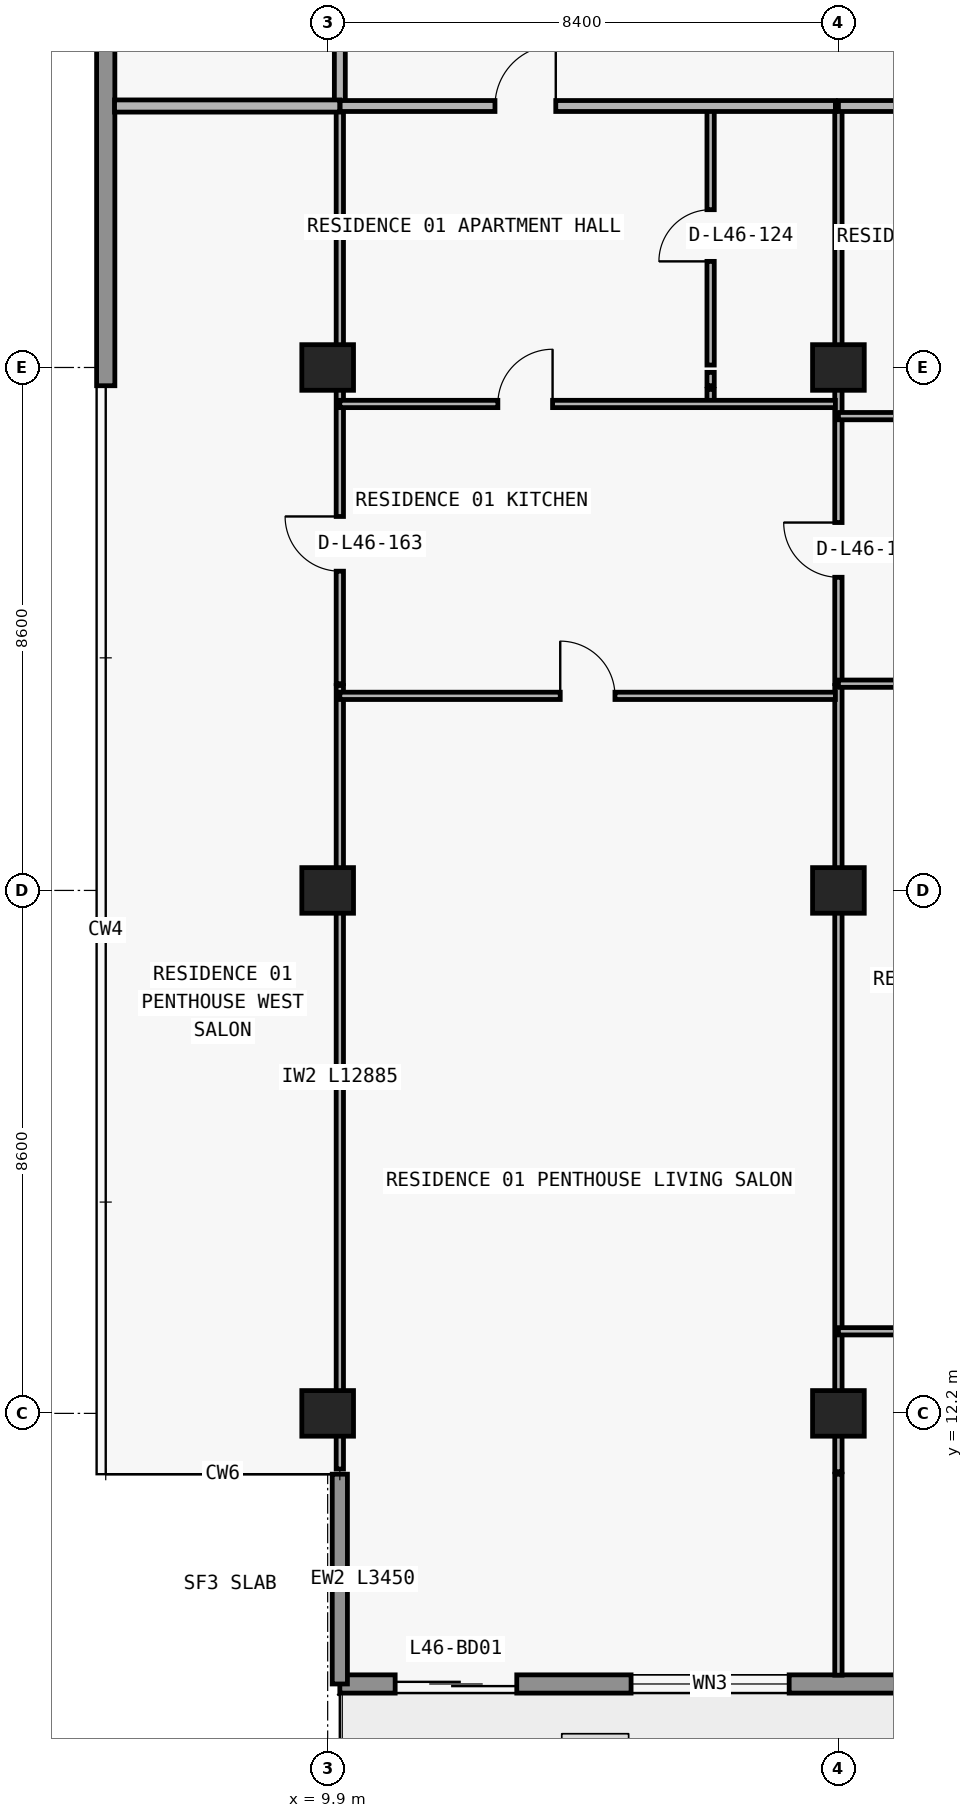
"""IFC4 building model, lengths in metres.
Left out: names, types, materials, properties, quantities, classifications, styles, units other than length and angle.
Written with IfcOpenShell. Run it as: python <this file> out.ifc"""

import sys

from ifc_helpers import new_model, si_unit, direction, frame, frame_2d, origin, origin_2d, place, context, subcontext, project, spatial, rectangle, extrude, element, fill, save


model = new_model("IFC4")
c1 = context("Model", 3, precision=1e-05, world=origin(), true_north=direction((0.0, 1.0)))
c2 = subcontext(c1, "Body", "Model", "MODEL_VIEW")
j1 = project(units=[si_unit("LENGTHUNIT", "METRE"), si_unit("PLANEANGLEUNIT", "RADIAN")], contexts=[c1])
p1 = place(None, origin())
s1 = spatial("IfcSite", under=j1, at=p1, CompositionType="ELEMENT")
p2 = place(p1, origin())
s2 = spatial("IfcBuilding", under=s1, at=p2, CompositionType="ELEMENT")
p3 = place(p2, frame((0.0, 0.0, 167.1)))
s3 = spatial("IfcBuildingStorey", under=s2, at=p3, CompositionType="ELEMENT", Elevation=167.1)
for number, where, z_axis, x_axis in (
    (1, (9.9, 12.2, 0.0), (0.0, 0.0, 1.0), (1.0, 0.0, 0.0)),
    (2, (18.3, 12.2, 0.0), (0.0, 0.0, 1.0), (1.0, 0.0, 0.0)),
    (3, (9.9, 20.8, 0.0), (0.0, 0.0, 1.0), (1.0, 0.0, 0.0)),
    (4, (18.3, 20.8, 0.0), (0.0, 0.0, 1.0), (1.0, 0.0, 0.0)),
    (5, (9.9, 29.4, 0.0), (0.0, 0.0, 1.0), (1.0, 0.0, 0.0)),
    (6, (18.3, 29.4, 0.0), (0.0, 0.0, 1.0), (1.0, 0.0, 0.0)),
):
    element("IfcColumn", number, at=place(p3, frame(where, z_axis=z_axis, x_axis=x_axis)), inside=s3, PredefinedType="COLUMN", context=c2, shape_type="SweptSolid", body=[
        extrude(rectangle(XDim=0.85, YDim=0.75, at=origin_2d()), origin(), (0.0, 0.0, 1.0), 3.05),
    ])
p4 = place(p3, frame((67.7, 7.75, 0.0), z_axis=(0.0, 0.0, 1.0), x_axis=(-1.0, 0.0, 0.0)))
e7 = element("IfcWall", 7, at=p4, inside=s3, PredefinedType="STANDARD", context=c2, shape_type="SweptSolid", body=[
    extrude(rectangle(XDim=57.6, YDim=0.3, at=frame_2d((28.8, 0.0))), origin(), (0.0, 0.0, 1.0), 3.05),
])
p5 = place(p4, frame((54.69, 0.0, 0.0)))
e8 = element("IfcOpeningElement", 8, at=p5, cuts=e7, PredefinedType="OPENING", context=c2, shape_type="SweptSolid", body=[
    extrude(rectangle(XDim=2.0, YDim=2.3, at=frame_2d((1.0, 1.15))), frame((0.0, 0.16, 0.0), z_axis=(0.0, -1.0, 0.0), x_axis=(1.0, 0.0, 0.0)), (0.0, 0.0, 1.0), 0.32),
])
p6 = place(p4, frame((50.21, 0.0, 0.65)))
e9 = element("IfcOpeningElement", 9, at=p6, cuts=e7, PredefinedType="OPENING", context=c2, shape_type="SweptSolid", body=[
    extrude(rectangle(XDim=2.6, YDim=1.85, at=frame_2d((1.3, 0.925))), frame((0.0, 0.16, 0.0), z_axis=(0.0, -1.0, 0.0), x_axis=(1.0, 0.0, 0.0)), (0.0, 0.0, 1.0), 0.32),
])
p7 = place(p4, frame((44.1, 0.0, 0.85)))
e10 = element("IfcOpeningElement", 10, at=p7, cuts=e7, PredefinedType="OPENING", context=c2, shape_type="SweptSolid", body=[
    extrude(rectangle(XDim=2.2, YDim=1.55, at=frame_2d((1.1, 0.775))), frame((0.0, 0.16, 0.0), z_axis=(0.0, -1.0, 0.0), x_axis=(1.0, 0.0, 0.0)), (0.0, 0.0, 1.0), 0.32),
])
p8 = place(p4, frame((37.69, 0.0, 0.0)))
e11 = element("IfcOpeningElement", 11, at=p8, cuts=e7, PredefinedType="OPENING", context=c2, shape_type="SweptSolid", body=[
    extrude(rectangle(XDim=2.0, YDim=2.3, at=frame_2d((1.0, 1.15))), frame((0.0, 0.16, 0.0), z_axis=(0.0, -1.0, 0.0), x_axis=(1.0, 0.0, 0.0)), (0.0, 0.0, 1.0), 0.32),
])
p9 = place(p4, frame((33.59, 0.0, 0.85)))
e12 = element("IfcOpeningElement", 12, at=p9, cuts=e7, PredefinedType="OPENING", context=c2, shape_type="SweptSolid", body=[
    extrude(rectangle(XDim=1.8, YDim=1.55, at=frame_2d((0.9, 0.775))), frame((0.0, 0.16, 0.0), z_axis=(0.0, -1.0, 0.0), x_axis=(1.0, 0.0, 0.0)), (0.0, 0.0, 1.0), 0.32),
])
p10 = place(p4, frame((25.914, 0.0, 0.85)))
e13 = element("IfcOpeningElement", 13, at=p10, cuts=e7, PredefinedType="OPENING", context=c2, shape_type="SweptSolid", body=[
    extrude(rectangle(XDim=2.2, YDim=1.55, at=frame_2d((1.1, 0.775))), frame((0.0, 0.16, 0.0), z_axis=(0.0, -1.0, 0.0), x_axis=(1.0, 0.0, 0.0)), (0.0, 0.0, 1.0), 0.32),
])
p11 = place(p4, frame((21.69, 0.0, 0.0)))
e14 = element("IfcOpeningElement", 14, at=p11, cuts=e7, PredefinedType="OPENING", context=c2, shape_type="SweptSolid", body=[
    extrude(rectangle(XDim=2.0, YDim=2.3, at=frame_2d((1.0, 1.15))), frame((0.0, 0.16, 0.0), z_axis=(0.0, -1.0, 0.0), x_axis=(1.0, 0.0, 0.0)), (0.0, 0.0, 1.0), 0.32),
])
p12 = place(p4, frame((17.59, 0.0, 0.85)))
e15 = element("IfcOpeningElement", 15, at=p12, cuts=e7, PredefinedType="OPENING", context=c2, shape_type="SweptSolid", body=[
    extrude(rectangle(XDim=1.8, YDim=1.55, at=frame_2d((0.9, 0.775))), frame((0.0, 0.16, 0.0), z_axis=(0.0, -1.0, 0.0), x_axis=(1.0, 0.0, 0.0)), (0.0, 0.0, 1.0), 0.32),
])
p13 = place(p4, frame((13.69, 0.0, 0.0)))
e16 = element("IfcOpeningElement", 16, at=p13, cuts=e7, PredefinedType="OPENING", context=c2, shape_type="SweptSolid", body=[
    extrude(rectangle(XDim=2.0, YDim=2.3, at=frame_2d((1.0, 1.15))), frame((0.0, 0.16, 0.0), z_axis=(0.0, -1.0, 0.0), x_axis=(1.0, 0.0, 0.0)), (0.0, 0.0, 1.0), 0.32),
])
p14 = place(p4, frame((9.01, 0.0, 0.65)))
e17 = element("IfcOpeningElement", 17, at=p14, cuts=e7, PredefinedType="OPENING", context=c2, shape_type="SweptSolid", body=[
    extrude(rectangle(XDim=2.6, YDim=1.85, at=frame_2d((1.3, 0.925))), frame((0.0, 0.16, 0.0), z_axis=(0.0, -1.0, 0.0), x_axis=(1.0, 0.0, 0.0)), (0.0, 0.0, 1.0), 0.32),
])
p15 = place(p4, frame((3.0, 0.0, 0.85)))
e18 = element("IfcOpeningElement", 18, at=p15, cuts=e7, PredefinedType="OPENING", context=c2, shape_type="SweptSolid", body=[
    extrude(rectangle(XDim=2.2, YDim=1.55, at=frame_2d((1.1, 0.775))), frame((0.0, 0.16, 0.0), z_axis=(0.0, -1.0, 0.0), x_axis=(1.0, 0.0, 0.0)), (0.0, 0.0, 1.0), 0.32),
])
p16 = place(p3, frame((10.1, 11.2, 0.0), z_axis=(0.0, 0.0, 1.0), x_axis=(0.0, -1.0, 0.0)))
e19 = element("IfcWall", 19, at=p16, inside=s3, PredefinedType="ELEMENTEDWALL", context=c2, shape_type="SweptSolid", body=[
    extrude(rectangle(XDim=3.45, YDim=0.25, at=frame_2d((1.725, 0.0))), origin(), (0.0, 0.0, 1.0), 3.05),
])
p17 = place(p3, frame((6.25, 29.1, 0.0), z_axis=(0.0, 0.0, 1.0), x_axis=(0.0, 1.0, 0.0)))
e20 = element("IfcWall", 20, at=p17, inside=s3, PredefinedType="STANDARD", context=c2, shape_type="SweptSolid", body=[
    extrude(rectangle(XDim=17.9, YDim=0.3, at=frame_2d((8.95, 0.0))), origin(), (0.0, 0.0, 1.0), 3.05),
])
p18 = place(p3, frame((10.1, 11.285, 0.0), z_axis=(0.0, 0.0, 1.0), x_axis=(0.0, 1.0, 0.0)))
e21 = element("IfcWall", 21, at=p18, inside=s3, PredefinedType="PARTITIONING", context=c2, shape_type="SweptSolid", body=[
    extrude(rectangle(XDim=12.885, YDim=0.12, at=frame_2d((6.442, 0.0))), origin(), (0.0, 0.0, 1.0), 2.263),
])
p19 = place(p3, frame((10.1, 24.2, 0.0), z_axis=(0.0, 0.0, 1.0), x_axis=(0.0, 1.0, 0.0)))
e22 = element("IfcWall", 22, at=p19, inside=s3, PredefinedType="PARTITIONING", context=c2, shape_type="SweptSolid", body=[
    extrude(rectangle(XDim=4.84, YDim=0.12, at=frame_2d((2.42, 0.0))), origin(), (0.0, 0.0, 1.0), 2.263),
])
p20 = place(p19, frame((1.85, 0.0, 0.0)))
e23 = element("IfcOpeningElement", 23, at=p20, cuts=e22, PredefinedType="OPENING", context=c2, shape_type="SweptSolid", body=[
    extrude(rectangle(XDim=0.9, YDim=2.15, at=frame_2d((0.45, 1.075))), frame((0.0, 0.07, 0.0), z_axis=(0.0, -1.0, 0.0), x_axis=(1.0, 0.0, 0.0)), (0.0, 0.0, 1.0), 0.14),
])
p21 = place(p3, frame((10.1, 29.1, 0.0), z_axis=(0.0, 0.0, 1.0), x_axis=(0.0, 1.0, 0.0)))
e24 = element("IfcWall", 24, at=p21, inside=s3, PredefinedType="PARTITIONING", context=c2, shape_type="SweptSolid", body=[
    extrude(rectangle(XDim=0.22, YDim=0.12, at=frame_2d((0.11, 0.0))), origin(), (0.0, 0.0, 1.0), 3.05),
])
p22 = place(p3, frame((10.1, 29.44, 0.0), z_axis=(0.0, 0.0, 1.0), x_axis=(0.0, 1.0, 0.0)))
e25 = element("IfcWall", 25, at=p22, inside=s3, PredefinedType="PARTITIONING", context=c2, shape_type="SweptSolid", body=[
    extrude(rectangle(XDim=4.26, YDim=0.12, at=frame_2d((2.13, 0.0))), origin(), (0.0, 0.0, 1.0), 2.263),
])
p23 = place(p3, frame((10.1, 33.705, 0.0), z_axis=(0.0, 0.0, 1.0), x_axis=(0.0, 1.0, 0.0)))
e26 = element("IfcWall", 26, at=p23, inside=s3, PredefinedType="PARTITIONING", context=c2, shape_type="SweptSolid", body=[
    extrude(rectangle(XDim=3.245, YDim=0.18, at=frame_2d((1.623, 0.0))), origin(), (0.0, 0.0, 1.0), 2.263),
])
p24 = place(p3, frame((16.198, 28.8, 0.0), z_axis=(0.0, 0.0, 1.0), x_axis=(0.0, 1.0, 0.0)))
e27 = element("IfcWall", 27, at=p24, inside=s3, PredefinedType="PARTITIONING", context=c2, shape_type="SweptSolid", body=[
    extrude(rectangle(XDim=0.24, YDim=0.12, at=frame_2d((0.12, 0.0))), origin(), (0.0, 0.0, 1.0), 3.05),
])
p25 = place(p3, frame((16.198, 29.1, 0.0), z_axis=(0.0, 0.0, 1.0), x_axis=(0.0, 1.0, 0.0)))
e28 = element("IfcWall", 28, at=p25, inside=s3, PredefinedType="PARTITIONING", context=c2, shape_type="SweptSolid", body=[
    extrude(rectangle(XDim=0.22, YDim=0.12, at=frame_2d((0.11, 0.0))), origin(), (0.0, 0.0, 1.0), 3.05),
])
p26 = place(p3, frame((16.198, 29.44, 0.0), z_axis=(0.0, 0.0, 1.0), x_axis=(0.0, 1.0, 0.0)))
e29 = element("IfcWall", 29, at=p26, inside=s3, PredefinedType="PARTITIONING", context=c2, shape_type="SweptSolid", body=[
    extrude(rectangle(XDim=4.26, YDim=0.12, at=frame_2d((2.13, 0.0))), origin(), (0.0, 0.0, 1.0), 3.05),
])
p27 = place(p26, frame((1.705, 0.0, 0.0)))
e30 = element("IfcOpeningElement", 30, at=p27, cuts=e29, PredefinedType="OPENING", context=c2, shape_type="SweptSolid", body=[
    extrude(rectangle(XDim=0.85, YDim=2.1, at=frame_2d((0.425, 1.05))), frame((0.0, 0.07, 0.0), z_axis=(0.0, -1.0, 0.0), x_axis=(1.0, 0.0, 0.0)), (0.0, 0.0, 1.0), 0.14),
])
p28 = place(p3, frame((18.3, 7.895, 0.0), z_axis=(0.0, 0.0, 1.0), x_axis=(0.0, 1.0, 0.0)))
e31 = element("IfcWall", 31, at=p28, inside=s3, PredefinedType="PARTITIONING", context=c2, shape_type="SweptSolid", body=[
    extrude(rectangle(XDim=3.305, YDim=0.12, at=frame_2d((1.652, 0.0))), origin(), (0.0, 0.0, 1.0), 3.05),
])
p29 = place(p3, frame((18.3, 11.24, 0.0), z_axis=(0.0, 0.0, 1.0), x_axis=(0.0, 1.0, 0.0)))
e32 = element("IfcWall", 32, at=p29, inside=s3, PredefinedType="PARTITIONING", context=c2, shape_type="SweptSolid", body=[
    extrude(rectangle(XDim=12.93, YDim=0.12, at=frame_2d((6.465, 0.0))), origin(), (0.0, 0.0, 1.0), 2.263),
])
p30 = place(p3, frame((18.3, 24.2, 0.0), z_axis=(0.0, 0.0, 1.0), x_axis=(0.0, 1.0, 0.0)))
e33 = element("IfcWall", 33, at=p30, inside=s3, PredefinedType="PARTITIONING", context=c2, shape_type="SweptSolid", body=[
    extrude(rectangle(XDim=4.84, YDim=0.12, at=frame_2d((2.42, 0.0))), origin(), (0.0, 0.0, 1.0), 2.263),
])
p31 = place(p30, frame((1.75, 0.0, 0.0)))
e34 = element("IfcOpeningElement", 34, at=p31, cuts=e33, PredefinedType="OPENING", context=c2, shape_type="SweptSolid", body=[
    extrude(rectangle(XDim=0.9, YDim=2.15, at=frame_2d((0.45, 1.075))), frame((0.0, 0.07, 0.0), z_axis=(0.0, -1.0, 0.0), x_axis=(1.0, 0.0, 0.0)), (0.0, 0.0, 1.0), 0.14),
])
p32 = place(p3, frame((18.3, 29.1, 0.0), z_axis=(0.0, 0.0, 1.0), x_axis=(0.0, 1.0, 0.0)))
e35 = element("IfcWall", 35, at=p32, inside=s3, PredefinedType="PARTITIONING", context=c2, shape_type="SweptSolid", body=[
    extrude(rectangle(XDim=0.22, YDim=0.12, at=frame_2d((0.11, 0.0))), origin(), (0.0, 0.0, 1.0), 3.05),
])
p33 = place(p3, frame((18.3, 29.44, 0.0), z_axis=(0.0, 0.0, 1.0), x_axis=(0.0, 1.0, 0.0)))
e36 = element("IfcWall", 36, at=p33, inside=s3, PredefinedType="PARTITIONING", context=c2, shape_type="SweptSolid", body=[
    extrude(rectangle(XDim=4.26, YDim=0.12, at=frame_2d((2.13, 0.0))), origin(), (0.0, 0.0, 1.0), 2.263),
])
p34 = place(p3, frame((18.3, 13.55, 0.0), z_axis=(0.0, 0.0, 1.0), x_axis=(1.0, 0.0, 0.0)))
e37 = element("IfcWall", 37, at=p34, inside=s3, PredefinedType="PARTITIONING", context=c2, shape_type="SweptSolid", body=[
    extrude(rectangle(XDim=8.35, YDim=0.12, at=frame_2d((4.175, 0.0))), origin(), (0.0, 0.0, 1.0), 3.05),
])
p35 = place(p34, frame((3.725, 0.0, 0.0)))
e38 = element("IfcOpeningElement", 38, at=p35, cuts=e37, PredefinedType="OPENING", context=c2, shape_type="SweptSolid", body=[
    extrude(rectangle(XDim=0.9, YDim=2.15, at=frame_2d((0.45, 1.075))), frame((0.0, 0.07, 0.0), z_axis=(0.0, -1.0, 0.0), x_axis=(1.0, 0.0, 0.0)), (0.0, 0.0, 1.0), 0.14),
])
p36 = place(p3, frame((10.1, 24.0, 0.0), z_axis=(0.0, 0.0, 1.0), x_axis=(1.0, 0.0, 0.0)))
e39 = element("IfcWall", 39, at=p36, inside=s3, PredefinedType="PARTITIONING", context=c2, shape_type="SweptSolid", body=[
    extrude(rectangle(XDim=8.15, YDim=0.12, at=frame_2d((4.075, 0.0))), origin(), (0.0, 0.0, 1.0), 3.05),
])
p37 = place(p36, frame((3.625, 0.0, 0.0)))
e40 = element("IfcOpeningElement", 40, at=p37, cuts=e39, PredefinedType="OPENING", context=c2, shape_type="SweptSolid", body=[
    extrude(rectangle(XDim=0.9, YDim=2.15, at=frame_2d((0.45, 1.075))), frame((0.0, 0.07, 0.0), z_axis=(0.0, -1.0, 0.0), x_axis=(1.0, 0.0, 0.0)), (0.0, 0.0, 1.0), 0.14),
])
p38 = place(p3, frame((18.3, 24.2, 0.0), z_axis=(0.0, 0.0, 1.0), x_axis=(1.0, 0.0, 0.0)))
e41 = element("IfcWall", 41, at=p38, inside=s3, PredefinedType="PARTITIONING", context=c2, shape_type="SweptSolid", body=[
    extrude(rectangle(XDim=8.18, YDim=0.12, at=frame_2d((4.09, 0.0))), origin(), (0.0, 0.0, 1.0), 3.05),
])
p39 = place(p38, frame((3.64, 0.0, 0.0)))
e42 = element("IfcOpeningElement", 42, at=p39, cuts=e41, PredefinedType="OPENING", context=c2, shape_type="SweptSolid", body=[
    extrude(rectangle(XDim=0.9, YDim=2.15, at=frame_2d((0.45, 1.075))), frame((0.0, 0.07, 0.0), z_axis=(0.0, -1.0, 0.0), x_axis=(1.0, 0.0, 0.0)), (0.0, 0.0, 1.0), 0.14),
])
p40 = place(p3, frame((18.3, 28.6, 0.0), z_axis=(0.0, 0.0, 1.0), x_axis=(1.0, 0.0, 0.0)))
e43 = element("IfcWall", 43, at=p40, inside=s3, PredefinedType="PARTITIONING", context=c2, shape_type="SweptSolid", body=[
    extrude(rectangle(XDim=8.18, YDim=0.12, at=frame_2d((4.09, 0.0))), origin(), (0.0, 0.0, 1.0), 3.05),
])
p41 = place(p40, frame((2.809, 0.0, 0.0)))
e44 = element("IfcOpeningElement", 44, at=p41, cuts=e43, PredefinedType="OPENING", context=c2, shape_type="SweptSolid", body=[
    extrude(rectangle(XDim=0.9, YDim=2.15, at=frame_2d((0.45, 1.075))), frame((0.0, 0.07, 0.0), z_axis=(0.0, -1.0, 0.0), x_axis=(1.0, 0.0, 0.0)), (0.0, 0.0, 1.0), 0.14),
])
p42 = place(p3, frame((10.1, 28.8, 0.0), z_axis=(0.0, 0.0, 1.0), x_axis=(1.0, 0.0, 0.0)))
e45 = element("IfcWall", 45, at=p42, inside=s3, PredefinedType="PARTITIONING", context=c2, shape_type="SweptSolid", body=[
    extrude(rectangle(XDim=8.15, YDim=0.12, at=frame_2d((4.075, 0.0))), origin(), (0.0, 0.0, 1.0), 3.05),
])
p43 = place(p42, frame((2.599, 0.0, 0.0)))
e46 = element("IfcOpeningElement", 46, at=p43, cuts=e45, PredefinedType="OPENING", context=c2, shape_type="SweptSolid", body=[
    extrude(rectangle(XDim=0.9, YDim=2.15, at=frame_2d((0.45, 1.075))), frame((0.0, 0.07, 0.0), z_axis=(0.0, -1.0, 0.0), x_axis=(1.0, 0.0, 0.0)), (0.0, 0.0, 1.0), 0.14),
])
p44 = place(p3, frame((6.395, 33.7, 0.0), z_axis=(0.0, 0.0, 1.0), x_axis=(1.0, 0.0, 0.0)))
e47 = element("IfcWall", 47, at=p44, inside=s3, PredefinedType="PARTITIONING", context=c2, shape_type="SweptSolid", body=[
    extrude(rectangle(XDim=3.705, YDim=0.2, at=frame_2d((1.853, 0.0))), origin(), (0.0, 0.0, 1.0), 3.05),
])
p45 = place(p3, frame((10.105, 33.7, 0.0), z_axis=(0.0, 0.0, 1.0), x_axis=(1.0, 0.0, 0.0)))
e48 = element("IfcWall", 48, at=p45, inside=s3, PredefinedType="PARTITIONING", context=c2, shape_type="SweptSolid", body=[
    extrude(rectangle(XDim=8.145, YDim=0.18, at=frame_2d((4.073, 0.0))), origin(), (0.0, 0.0, 1.0), 3.05),
])
p46 = place(p45, frame((2.546, 0.0, 0.0)))
e49 = element("IfcOpeningElement", 49, at=p46, cuts=e48, PredefinedType="OPENING", context=c2, shape_type="SweptSolid", body=[
    extrude(rectangle(XDim=1.0, YDim=2.2, at=frame_2d((0.5, 1.1))), frame((0.0, 0.1, 0.0), z_axis=(0.0, -1.0, 0.0), x_axis=(1.0, 0.0, 0.0)), (0.0, 0.0, 1.0), 0.2),
])
p47 = place(p3, frame((18.3, 33.7, 0.0), z_axis=(0.0, 0.0, 1.0), x_axis=(1.0, 0.0, 0.0)))
e50 = element("IfcWall", 50, at=p47, inside=s3, PredefinedType="PARTITIONING", context=c2, shape_type="SweptSolid", body=[
    extrude(rectangle(XDim=8.35, YDim=0.18, at=frame_2d((4.175, 0.0))), origin(), (0.0, 0.0, 1.0), 3.05),
])
p48 = place(p5, origin())
e51 = element("IfcDoor", 51, at=p48, inside=s3, OperationType="DOUBLE_DOOR_SLIDING", PredefinedType="DOOR", context=c2, shape_type="SweptSolid", body=[
    extrude(rectangle(XDim=2.0, YDim=2.3, at=frame_2d((1.0, 1.15))), frame((0.0, 0.025, 0.0), z_axis=(0.0, -1.0, 0.0), x_axis=(1.0, 0.0, 0.0)), (0.0, 0.0, 1.0), 0.05),
])
fill(e8, e51)
p49 = place(p6, origin())
e52 = element("IfcWindow", 52, at=p49, inside=s3, PartitioningType="SINGLE_PANEL", PredefinedType="WINDOW", context=c2, shape_type="SweptSolid", body=[
    extrude(rectangle(XDim=2.6, YDim=1.85, at=frame_2d((1.3, 0.925))), frame((0.0, 0.03, 0.0), z_axis=(0.0, -1.0, 0.0), x_axis=(1.0, 0.0, 0.0)), (0.0, 0.0, 1.0), 0.06),
])
fill(e9, e52)
p50 = place(p46, origin())
e53 = element("IfcDoor", 53, at=p50, inside=s3, OperationType="SINGLE_SWING_RIGHT", PredefinedType="DOOR", context=c2, shape_type="SweptSolid", body=[
    extrude(rectangle(XDim=1.0, YDim=2.2, at=frame_2d((0.5, 1.1))), frame((0.0, 0.025, 0.0), z_axis=(0.0, -1.0, 0.0), x_axis=(1.0, 0.0, 0.0)), (0.0, 0.0, 1.0), 0.05),
])
fill(e49, e53)
p51 = place(p27, origin())
e54 = element("IfcDoor", 54, at=p51, inside=s3, OperationType="SINGLE_SWING_LEFT", PredefinedType="DOOR", context=c2, shape_type="SweptSolid", body=[
    extrude(rectangle(XDim=0.85, YDim=2.1, at=frame_2d((0.425, 1.05))), frame((0.0, 0.025, 0.0), z_axis=(0.0, -1.0, 0.0), x_axis=(1.0, 0.0, 0.0)), (0.0, 0.0, 1.0), 0.05),
])
fill(e30, e54)
p52 = place(p43, origin())
e55 = element("IfcDoor", 55, at=p52, inside=s3, OperationType="SINGLE_SWING_RIGHT", PredefinedType="DOOR", context=c2, shape_type="SweptSolid", body=[
    extrude(rectangle(XDim=0.9, YDim=2.15, at=frame_2d((0.45, 1.075))), frame((0.0, 0.025, 0.0), z_axis=(0.0, -1.0, 0.0), x_axis=(1.0, 0.0, 0.0)), (0.0, 0.0, 1.0), 0.05),
])
fill(e46, e55)
p53 = place(p37, origin())
e56 = element("IfcDoor", 56, at=p53, inside=s3, OperationType="SINGLE_SWING_LEFT", PredefinedType="DOOR", context=c2, shape_type="SweptSolid", body=[
    extrude(rectangle(XDim=0.9, YDim=2.15, at=frame_2d((0.45, 1.075))), frame((0.0, 0.025, 0.0), z_axis=(0.0, -1.0, 0.0), x_axis=(1.0, 0.0, 0.0)), (0.0, 0.0, 1.0), 0.05),
])
fill(e40, e56)
p54 = place(p31, origin())
e57 = element("IfcDoor", 57, at=p54, inside=s3, OperationType="SINGLE_SWING_RIGHT", PredefinedType="DOOR", context=c2, shape_type="SweptSolid", body=[
    extrude(rectangle(XDim=0.9, YDim=2.15, at=frame_2d((0.45, 1.075))), frame((0.0, 0.025, 0.0), z_axis=(0.0, -1.0, 0.0), x_axis=(1.0, 0.0, 0.0)), (0.0, 0.0, 1.0), 0.05),
])
fill(e34, e57)
p55 = place(p20, origin())
e58 = element("IfcDoor", 58, at=p55, inside=s3, OperationType="SINGLE_SWING_RIGHT", PredefinedType="DOOR", context=c2, shape_type="SweptSolid", body=[
    extrude(rectangle(XDim=0.9, YDim=2.15, at=frame_2d((0.45, 1.075))), frame((0.0, 0.025, 0.0), z_axis=(0.0, -1.0, 0.0), x_axis=(1.0, 0.0, 0.0)), (0.0, 0.0, 1.0), 0.05),
])
fill(e23, e58)
save(model, sys.argv[1])
